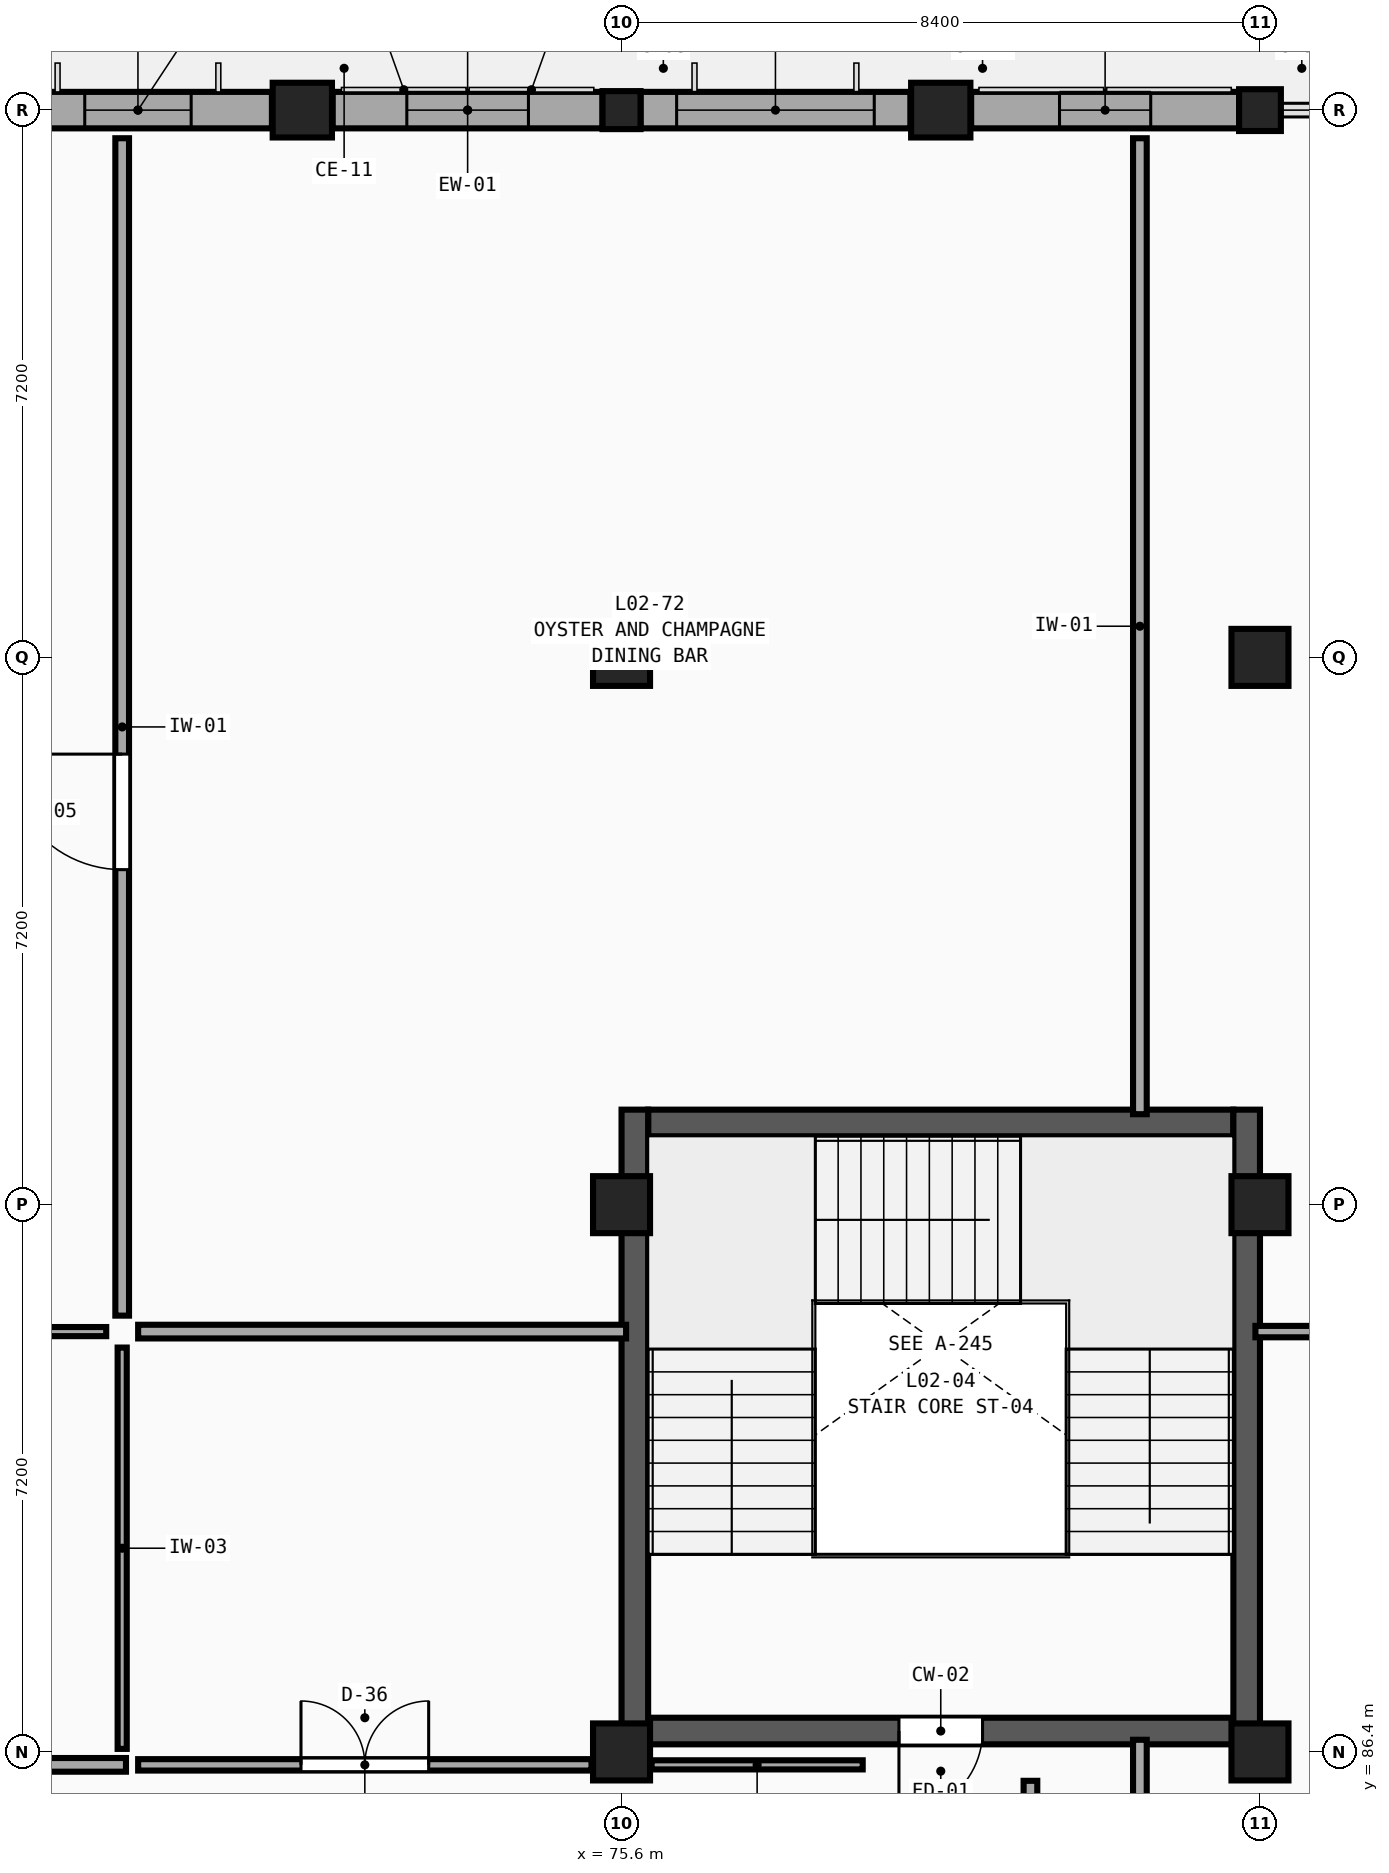
"""IFC4 building model, lengths in metres.
Left out: names, types, materials, properties, quantities, classifications, styles, units other than length and angle.
Written with IfcOpenShell. Run it as: python <this file> out.ifc"""

import sys

from ifc_helpers import new_model, si_unit, direction, frame, frame_2d, origin, origin_2d, place, context, subcontext, project, spatial, rectangle, extrude, element, fill, save


model = new_model("IFC4")
c1 = context("Model", 3, precision=1e-05, world=origin(), true_north=direction((0.0, 1.0)))
c2 = subcontext(c1, "Body", "Model", "MODEL_VIEW")
j1 = project(units=[si_unit("LENGTHUNIT", "METRE"), si_unit("PLANEANGLEUNIT", "RADIAN")], contexts=[c1])
p1 = place(None, origin())
s1 = spatial("IfcSite", under=j1, at=p1, CompositionType="ELEMENT")
p2 = place(p1, origin())
s2 = spatial("IfcBuilding", under=s1, at=p2, CompositionType="ELEMENT")
p3 = place(p2, frame((0.0, 0.0, 9.9)))
s3 = spatial("IfcBuildingStorey", under=s2, at=p3, CompositionType="ELEMENT", Elevation=9.9)
for number, where, z_axis, x_axis in (
    (1, (75.6, 86.4, 0.0), (0.0, 0.0, 1.0), (1.0, 0.0, 0.0)),
    (2, (75.6, 93.6, 0.0), (0.0, 0.0, 1.0), (1.0, 0.0, 0.0)),
    (3, (75.6, 100.8, 0.0), (0.0, 0.0, 1.0), (1.0, 0.0, 0.0)),
):
    element("IfcColumn", number, at=place(p3, frame(where, z_axis=z_axis, x_axis=x_axis)), inside=s3, PredefinedType="COLUMN", context=c2, shape_type="SweptSolid", body=[
        extrude(rectangle(XDim=0.75, YDim=0.75, at=origin_2d()), origin(), (0.0, 0.0, 1.0), 4.5),
    ])
p4 = place(p3, frame((75.6, 108.0, 0.0), z_axis=(0.0, 0.0, 1.0), x_axis=(1.0, 0.0, 0.0)))
e4 = element("IfcColumn", 4, at=p4, inside=s3, PredefinedType="COLUMN", context=c2, shape_type="SweptSolid", body=[
    extrude(rectangle(XDim=0.5, YDim=0.5, at=origin_2d()), origin(), (0.0, 0.0, 1.0), 4.5),
])
for number, where, z_axis, x_axis in (
    (5, (84.0, 86.4, 0.0), (0.0, 0.0, 1.0), (1.0, 0.0, 0.0)),
    (6, (84.0, 93.6, 0.0), (0.0, 0.0, 1.0), (1.0, 0.0, 0.0)),
    (7, (84.0, 100.8, 0.0), (0.0, 0.0, 1.0), (1.0, 0.0, 0.0)),
):
    element("IfcColumn", number, at=place(p3, frame(where, z_axis=z_axis, x_axis=x_axis)), inside=s3, PredefinedType="COLUMN", context=c2, shape_type="SweptSolid", body=[
        extrude(rectangle(XDim=0.75, YDim=0.75, at=origin_2d()), origin(), (0.0, 0.0, 1.0), 4.5),
    ])
p5 = place(p3, frame((84.0, 108.0, 0.0), z_axis=(0.0, 0.0, 1.0), x_axis=(1.0, 0.0, 0.0)))
e8 = element("IfcColumn", 8, at=p5, inside=s3, PredefinedType="COLUMN", context=c2, shape_type="SweptSolid", body=[
    extrude(rectangle(XDim=0.55, YDim=0.55, at=origin_2d()), origin(), (0.0, 0.0, 1.0), 4.5),
])
for number, where, z_axis, x_axis in (
    (9, (71.4, 108.0, 0.0), (0.0, 0.0, 1.0), (1.0, 0.0, 0.0)),
    (10, (79.8, 108.0, 0.0), (0.0, 0.0, 1.0), (1.0, 0.0, 0.0)),
):
    element("IfcColumn", number, at=place(p3, frame(where, z_axis=z_axis, x_axis=x_axis)), inside=s3, PredefinedType="PILASTER", context=c2, shape_type="SweptSolid", body=[
        extrude(rectangle(XDim=0.78, YDim=0.72, at=origin_2d()), origin(), (0.0, 0.0, 1.0), 4.5),
    ])
p6 = place(p3, frame((67.475, 108.0, 0.0), z_axis=(0.0, 0.0, 1.0), x_axis=(1.0, 0.0, 0.0)))
e11 = element("IfcWall", 11, at=p6, inside=s3, PredefinedType="SOLIDWALL", context=c2, shape_type="SweptSolid", body=[
    extrude(rectangle(XDim=3.525, YDim=0.48, at=frame_2d((1.762, 0.0))), origin(), (0.0, 0.0, 1.0), 3.63),
])
p7 = place(p6, frame((1.062, 0.0, 0.75)))
e12 = element("IfcOpeningElement", 12, at=p7, cuts=e11, PredefinedType="OPENING", context=c2, shape_type="SweptSolid", body=[
    extrude(rectangle(XDim=1.4, YDim=2.26, at=frame_2d((0.7, 1.13))), frame((0.0, 0.26, 0.0), z_axis=(0.0, -1.0, 0.0), x_axis=(1.0, 0.0, 0.0)), (0.0, 0.0, 1.0), 0.52),
])
p8 = place(p3, frame((71.8, 108.0, 0.0), z_axis=(0.0, 0.0, 1.0), x_axis=(1.0, 0.0, 0.0)))
e13 = element("IfcWall", 13, at=p8, inside=s3, PredefinedType="SOLIDWALL", context=c2, shape_type="SweptSolid", body=[
    extrude(rectangle(XDim=3.55, YDim=0.48, at=frame_2d((1.775, 0.0))), origin(), (0.0, 0.0, 1.0), 3.63),
])
p9 = place(p8, frame((0.975, 0.0, 0.75)))
e14 = element("IfcOpeningElement", 14, at=p9, cuts=e13, PredefinedType="OPENING", context=c2, shape_type="SweptSolid", body=[
    extrude(rectangle(XDim=1.6, YDim=2.26, at=frame_2d((0.8, 1.13))), frame((0.0, 0.26, 0.0), z_axis=(0.0, -1.0, 0.0), x_axis=(1.0, 0.0, 0.0)), (0.0, 0.0, 1.0), 0.52),
])
p10 = place(p3, frame((75.85, 108.0, 0.0), z_axis=(0.0, 0.0, 1.0), x_axis=(1.0, 0.0, 0.0)))
e15 = element("IfcWall", 15, at=p10, inside=s3, PredefinedType="SOLIDWALL", context=c2, shape_type="SweptSolid", body=[
    extrude(rectangle(XDim=3.55, YDim=0.48, at=frame_2d((1.775, 0.0))), origin(), (0.0, 0.0, 1.0), 3.63),
])
p11 = place(p10, frame((0.475, 0.0, 0.75)))
e16 = element("IfcOpeningElement", 16, at=p11, cuts=e15, PredefinedType="OPENING", context=c2, shape_type="SweptSolid", body=[
    extrude(rectangle(XDim=2.6, YDim=2.26, at=frame_2d((1.3, 1.13))), frame((0.0, 0.26, 0.0), z_axis=(0.0, -1.0, 0.0), x_axis=(1.0, 0.0, 0.0)), (0.0, 0.0, 1.0), 0.52),
])
p12 = place(p3, frame((80.2, 108.0, 0.0), z_axis=(0.0, 0.0, 1.0), x_axis=(1.0, 0.0, 0.0)))
e17 = element("IfcWall", 17, at=p12, inside=s3, PredefinedType="SOLIDWALL", context=c2, shape_type="SweptSolid", body=[
    extrude(rectangle(XDim=3.525, YDim=0.48, at=frame_2d((1.763, 0.0))), origin(), (0.0, 0.0, 1.0), 3.63),
])
p13 = place(p12, frame((1.163, 0.0, 0.75)))
e18 = element("IfcOpeningElement", 18, at=p13, cuts=e17, PredefinedType="OPENING", context=c2, shape_type="SweptSolid", body=[
    extrude(rectangle(XDim=1.2, YDim=2.44, at=frame_2d((0.6, 1.22))), frame((0.0, 0.26, 0.0), z_axis=(0.0, -1.0, 0.0), x_axis=(1.0, 0.0, 0.0)), (0.0, 0.0, 1.0), 0.52),
])
p14 = place(p3, frame((83.65, 86.675, 0.0), z_axis=(0.0, 0.0, 1.0), x_axis=(-1.0, 0.0, 0.0)))
e19 = element("IfcWall", 19, at=p14, inside=s3, PredefinedType="SHEAR", context=c2, shape_type="SweptSolid", body=[
    extrude(rectangle(XDim=7.7, YDim=0.35, at=frame_2d((3.85, 0.0))), origin(), (0.0, 0.0, 1.0), 4.5),
])
p15 = place(p14, frame((3.3, 0.0, 0.0)))
e20 = element("IfcOpeningElement", 20, at=p15, cuts=e19, PredefinedType="OPENING", context=c2, shape_type="SweptSolid", body=[
    extrude(rectangle(XDim=1.1, YDim=2.2, at=frame_2d((0.55, 1.1))), frame((0.0, 0.195, 0.0), z_axis=(0.0, -1.0, 0.0), x_axis=(1.0, 0.0, 0.0)), (0.0, 0.0, 1.0), 0.39),
])
p16 = place(p3, frame((75.95, 94.675, 0.0), z_axis=(0.0, 0.0, 1.0), x_axis=(1.0, 0.0, 0.0)))
e21 = element("IfcWall", 21, at=p16, inside=s3, PredefinedType="SHEAR", context=c2, shape_type="SweptSolid", body=[
    extrude(rectangle(XDim=7.7, YDim=0.35, at=frame_2d((3.85, 0.0))), origin(), (0.0, 0.0, 1.0), 4.5),
])
for number, where, z_axis, x_axis in (
    (22, (75.775, 94.85, 0.0), (0.0, 0.0, 1.0), (0.0, -1.0, 0.0)),
    (23, (83.825, 86.5, 0.0), (0.0, 0.0, 1.0), (0.0, 1.0, 0.0)),
):
    element("IfcWall", number, at=place(p3, frame(where, z_axis=z_axis, x_axis=x_axis)), inside=s3, PredefinedType="SHEAR", context=c2, shape_type="SweptSolid", body=[
        extrude(rectangle(XDim=8.35, YDim=0.35, at=frame_2d((4.175, 0.0))), origin(), (0.0, 0.0, 1.0), 4.5),
    ])
p17 = place(p3, frame((67.595, 86.23, 0.0), z_axis=(0.0, 0.0, 1.0), x_axis=(1.0, 0.0, 0.0)))
e24 = element("IfcWall", 24, at=p17, inside=s3, PredefinedType="PARTITIONING", context=c2, shape_type="SweptSolid", body=[
    extrude(rectangle(XDim=1.485, YDim=0.18, at=frame_2d((0.743, 0.0))), origin(), (0.0, 0.0, 1.0), 3.73),
])
p18 = place(p3, frame((69.24, 86.23, 0.0), z_axis=(0.0, 0.0, 1.0), x_axis=(1.0, 0.0, 0.0)))
e25 = element("IfcWall", 25, at=p18, inside=s3, PredefinedType="PARTITIONING", context=c2, shape_type="SweptSolid", body=[
    extrude(rectangle(XDim=5.965, YDim=0.15, at=frame_2d((2.982, 0.0))), origin(), (0.0, 0.0, 1.0), 3.73),
])
p19 = place(p18, frame((2.143, 0.0, 0.0)))
e26 = element("IfcOpeningElement", 26, at=p19, cuts=e25, PredefinedType="OPENING", context=c2, shape_type="SweptSolid", body=[
    extrude(rectangle(XDim=1.68, YDim=2.45, at=frame_2d((0.84, 1.225))), frame((0.0, 0.095, 0.0), z_axis=(0.0, -1.0, 0.0), x_axis=(1.0, 0.0, 0.0)), (0.0, 0.0, 1.0), 0.19),
])
p20 = place(p3, frame((75.995, 86.23, 0.0), z_axis=(0.0, 0.0, 1.0), x_axis=(1.0, 0.0, 0.0)))
e27 = element("IfcWall", 27, at=p20, inside=s3, PredefinedType="PARTITIONING", context=c2, shape_type="SweptSolid", body=[
    extrude(rectangle(XDim=2.778, YDim=0.12, at=frame_2d((1.389, 0.0))), origin(), (0.0, 0.0, 1.0), 3.73),
])
p21 = place(p3, frame((80.98, 84.18, 0.0), z_axis=(0.0, 0.0, 1.0), x_axis=(0.0, 1.0, 0.0)))
e28 = element("IfcWall", 28, at=p21, inside=s3, PredefinedType="PARTITIONING", context=c2, shape_type="SweptSolid", body=[
    extrude(rectangle(XDim=1.84, YDim=0.18, at=frame_2d((0.92, 0.0))), origin(), (0.0, 0.0, 1.0), 4.18),
])
p22 = place(p21, frame((0.4, 0.0, 0.0)))
e29 = element("IfcOpeningElement", 29, at=p22, cuts=e28, PredefinedType="OPENING", context=c2, shape_type="SweptSolid", body=[
    extrude(rectangle(XDim=1.04, YDim=2.21, at=frame_2d((0.52, 1.105))), frame((0.0, 0.11, 0.0), z_axis=(0.0, -1.0, 0.0), x_axis=(1.0, 0.0, 0.0)), (0.0, 0.0, 1.0), 0.22),
])
p23 = place(p3, frame((48.94, 91.93, 0.0), z_axis=(0.0, 0.0, 1.0), x_axis=(1.0, 0.0, 0.0)))
e30 = element("IfcWall", 30, at=p23, inside=s3, PredefinedType="PARTITIONING", context=c2, shape_type="SweptSolid", body=[
    extrude(rectangle(XDim=19.88, YDim=0.12, at=frame_2d((9.94, 0.0))), origin(), (0.0, 0.0, 1.0), 4.18),
])
p24 = place(p23, frame((7.98, 0.0, 0.0)))
e31 = element("IfcOpeningElement", 31, at=p24, cuts=e30, PredefinedType="OPENING", context=c2, shape_type="SweptSolid", body=[
    extrude(rectangle(XDim=0.88, YDim=2.05, at=frame_2d((0.44, 1.025))), frame((0.0, 0.08, 0.0), z_axis=(0.0, -1.0, 0.0), x_axis=(1.0, 0.0, 0.0)), (0.0, 0.0, 1.0), 0.16),
])
p25 = place(p3, frame((83.94, 91.93, 0.0), z_axis=(0.0, 0.0, 1.0), x_axis=(1.0, 0.0, 0.0)))
e32 = element("IfcWall", 32, at=p25, inside=s3, PredefinedType="PARTITIONING", context=c2, shape_type="SweptSolid", body=[
    extrude(rectangle(XDim=16.49, YDim=0.15, at=frame_2d((8.245, 0.0))), origin(), (0.0, 0.0, 1.0), 4.18),
])
p26 = place(p25, frame((6.422, 0.0, 0.0)))
e33 = element("IfcOpeningElement", 33, at=p26, cuts=e32, PredefinedType="OPENING", context=c2, shape_type="SweptSolid", body=[
    extrude(rectangle(XDim=1.2, YDim=2.05, at=frame_2d((0.6, 1.025))), frame((0.0, 0.095, 0.0), z_axis=(0.0, -1.0, 0.0), x_axis=(1.0, 0.0, 0.0)), (0.0, 0.0, 1.0), 0.19),
])
p27 = place(p3, frame((69.03, 92.14, 0.0), z_axis=(0.0, 0.0, 1.0), x_axis=(0.0, 1.0, 0.0)))
e34 = element("IfcWall", 34, at=p27, inside=s3, PredefinedType="PARTITIONING", context=c2, shape_type="SweptSolid", body=[
    extrude(rectangle(XDim=15.49, YDim=0.18, at=frame_2d((7.745, 0.0))), origin(), (0.0, 0.0, 1.0), 4.18),
])
p28 = place(p27, frame((5.867, 0.0, 0.0)))
e35 = element("IfcOpeningElement", 35, at=p28, cuts=e34, PredefinedType="OPENING", context=c2, shape_type="SweptSolid", body=[
    extrude(rectangle(XDim=1.52, YDim=2.05, at=frame_2d((0.76, 1.025))), frame((0.0, 0.11, 0.0), z_axis=(0.0, -1.0, 0.0), x_axis=(1.0, 0.0, 0.0)), (0.0, 0.0, 1.0), 0.22),
])
p29 = place(p3, frame((82.42, 94.79, 0.0), z_axis=(0.0, 0.0, 1.0), x_axis=(0.0, 1.0, 0.0)))
e36 = element("IfcWall", 36, at=p29, inside=s3, PredefinedType="PARTITIONING", context=c2, shape_type="SweptSolid", body=[
    extrude(rectangle(XDim=12.84, YDim=0.18, at=frame_2d((6.42, 0.0))), origin(), (0.0, 0.0, 1.0), 4.18),
])
p30 = place(p3, frame((82.42, 75.473, 0.0), z_axis=(0.0, 0.0, 1.0), x_axis=(0.0, 1.0, 0.0)))
e37 = element("IfcWall", 37, at=p30, inside=s3, PredefinedType="PARTITIONING", context=c2, shape_type="SweptSolid", body=[
    extrude(rectangle(XDim=11.087, YDim=0.18, at=frame_2d((5.543, 0.0))), origin(), (0.0, 0.0, 1.0), 4.18),
])
p31 = place(p3, frame((69.24, 91.93, 0.0), z_axis=(0.0, 0.0, 1.0), x_axis=(1.0, 0.0, 0.0)))
e38 = element("IfcWall", 38, at=p31, inside=s3, PredefinedType="PARTITIONING", context=c2, shape_type="SweptSolid", body=[
    extrude(rectangle(XDim=6.42, YDim=0.18, at=frame_2d((3.21, 0.0))), origin(), (0.0, 0.0, 1.0), 4.18),
])
p32 = place(p3, frame((69.03, 86.44, 0.0), z_axis=(0.0, 0.0, 1.0), x_axis=(0.0, 1.0, 0.0)))
e39 = element("IfcWall", 39, at=p32, inside=s3, PredefinedType="PARTITIONING", context=c2, shape_type="SweptSolid", body=[
    extrude(rectangle(XDim=5.28, YDim=0.12, at=frame_2d((2.64, 0.0))), origin(), (0.0, 0.0, 1.0), 4.18),
])
p33 = place(p7, origin())
e40 = element("IfcWindow", 40, at=p33, inside=s3, PartitioningType="DOUBLE_PANEL_VERTICAL", PredefinedType="WINDOW", context=c2, shape_type="SweptSolid", body=[
    extrude(rectangle(XDim=1.4, YDim=2.26, at=frame_2d((0.7, 1.13))), frame((0.0, 0.03, 0.0), z_axis=(0.0, -1.0, 0.0), x_axis=(1.0, 0.0, 0.0)), (0.0, 0.0, 1.0), 0.06),
])
fill(e12, e40)
p34 = place(p9, origin())
e41 = element("IfcWindow", 41, at=p34, inside=s3, PartitioningType="DOUBLE_PANEL_VERTICAL", PredefinedType="WINDOW", context=c2, shape_type="SweptSolid", body=[
    extrude(rectangle(XDim=1.6, YDim=2.26, at=frame_2d((0.8, 1.13))), frame((0.0, 0.03, 0.0), z_axis=(0.0, -1.0, 0.0), x_axis=(1.0, 0.0, 0.0)), (0.0, 0.0, 1.0), 0.06),
])
fill(e14, e41)
p35 = place(p11, origin())
e42 = element("IfcWindow", 42, at=p35, inside=s3, PartitioningType="TRIPLE_PANEL_VERTICAL", PredefinedType="WINDOW", context=c2, shape_type="SweptSolid", body=[
    extrude(rectangle(XDim=2.6, YDim=2.26, at=frame_2d((1.3, 1.13))), frame((0.0, 0.03, 0.0), z_axis=(0.0, -1.0, 0.0), x_axis=(1.0, 0.0, 0.0)), (0.0, 0.0, 1.0), 0.06),
])
fill(e16, e42)
p36 = place(p13, origin())
e43 = element("IfcWindow", 43, at=p36, inside=s3, PartitioningType="SINGLE_PANEL", PredefinedType="WINDOW", context=c2, shape_type="SweptSolid", body=[
    extrude(rectangle(XDim=1.2, YDim=2.44, at=frame_2d((0.6, 1.22))), frame((0.0, 0.03, 0.0), z_axis=(0.0, -1.0, 0.0), x_axis=(1.0, 0.0, 0.0)), (0.0, 0.0, 1.0), 0.06),
])
fill(e18, e43)
p37 = place(p15, origin())
e44 = element("IfcDoor", 44, at=p37, inside=s3, OperationType="SINGLE_SWING_RIGHT", PredefinedType="DOOR", context=c2, shape_type="SweptSolid", body=[
    extrude(rectangle(XDim=1.1, YDim=2.2, at=frame_2d((0.55, 1.1))), frame((0.0, 0.025, 0.0), z_axis=(0.0, -1.0, 0.0), x_axis=(1.0, 0.0, 0.0)), (0.0, 0.0, 1.0), 0.05),
])
fill(e20, e44)
p38 = place(p19, origin())
e45 = element("IfcDoor", 45, at=p38, inside=s3, OperationType="DOUBLE_DOOR_SINGLE_SWING", PredefinedType="DOOR", context=c2, shape_type="SweptSolid", body=[
    extrude(rectangle(XDim=1.68, YDim=2.45, at=frame_2d((0.84, 1.225))), frame((0.0, 0.025, 0.0), z_axis=(0.0, -1.0, 0.0), x_axis=(1.0, 0.0, 0.0)), (0.0, 0.0, 1.0), 0.05),
])
fill(e26, e45)
p39 = place(p28, origin())
e46 = element("IfcDoor", 46, at=p39, inside=s3, OperationType="SINGLE_SWING_RIGHT", PredefinedType="DOOR", context=c2, shape_type="SweptSolid", body=[
    extrude(rectangle(XDim=1.52, YDim=2.05, at=frame_2d((0.76, 1.025))), frame((0.0, 0.025, 0.0), z_axis=(0.0, -1.0, 0.0), x_axis=(1.0, 0.0, 0.0)), (0.0, 0.0, 1.0), 0.05),
])
fill(e35, e46)
save(model, sys.argv[1])
